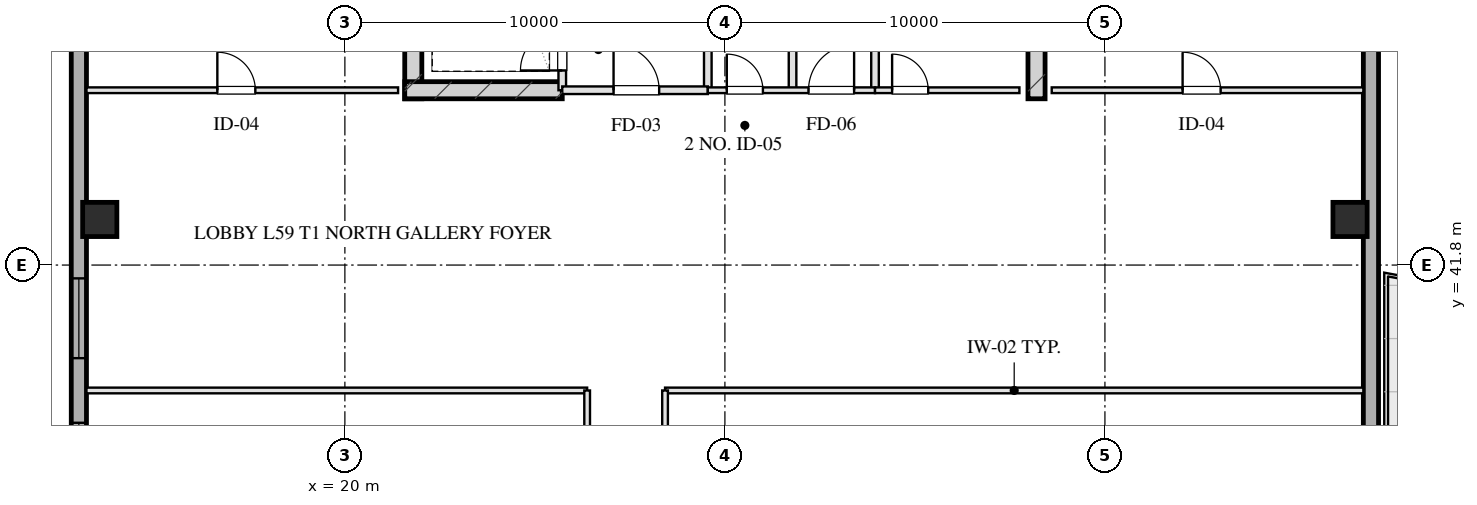
"""IFC4 building model, lengths in metres.
Left out: names, types, materials, properties, quantities, classifications, styles, units other than length and angle.
Written with IfcOpenShell. Run it as: python <this file> out.ifc"""

import sys

from ifc_helpers import new_model, si_unit, direction, frame, frame_2d, origin, origin_2d, place, context, subcontext, project, spatial, rectangle, hollow_rectangle, extrude, element, fill, save


model = new_model("IFC4")
c1 = context("Model", 3, precision=1e-05, world=origin(), true_north=direction((0.0, 1.0)))
c2 = subcontext(c1, "Body", "Model", "MODEL_VIEW")
j1 = project(units=[si_unit("LENGTHUNIT", "METRE"), si_unit("PLANEANGLEUNIT", "RADIAN")], contexts=[c1])
p1 = place(None, origin())
s1 = spatial("IfcSite", under=j1, at=p1, CompositionType="ELEMENT")
p2 = place(p1, origin())
s2 = spatial("IfcBuilding", under=s1, at=p2, CompositionType="ELEMENT")
p3 = place(p2, frame((0.0, 0.0, 219.65)))
s3 = spatial("IfcBuildingStorey", under=s2, at=p3, CompositionType="ELEMENT", Elevation=219.65)
for number, where, z_axis, x_axis in (
    (1, (21.8, 46.175, 0.0), (0.0, 0.0, 1.0), (0.0, 1.0, 0.0)),
    (2, (38.2, 46.175, 0.0), (0.0, 0.0, 1.0), (0.0, 1.0, 0.0)),
):
    element("IfcWall", number, at=place(p3, frame(where, z_axis=z_axis, x_axis=x_axis)), inside=s3, PredefinedType="SHEAR", context=c2, shape_type="SweptSolid", body=[
        extrude(rectangle(XDim=9.33, YDim=0.45, at=frame_2d((4.665, 0.0))), origin(), (0.0, 0.0, 1.0), 3.45),
    ])
p4 = place(p3, frame((21.575, 46.4, 0.0), z_axis=(0.0, 0.0, 1.0), x_axis=(1.0, 0.0, 0.0)))
e3 = element("IfcWall", 3, at=p4, inside=s3, PredefinedType="SHEAR", context=c2, shape_type="SweptSolid", body=[
    extrude(rectangle(XDim=4.145, YDim=0.45, at=frame_2d((2.073, 0.0))), origin(), (0.0, 0.0, 1.0), 3.45),
])
for number, where, z_axis, x_axis in (
    (4, (13.55, 43.0, 0.0), (0.0, 0.0, 1.0), (1.0, 0.0, 0.0)),
    (5, (46.45, 43.0, 0.0), (0.0, 0.0, 1.0), (1.0, 0.0, 0.0)),
):
    element("IfcColumn", number, at=place(p3, frame(where, z_axis=z_axis, x_axis=x_axis)), inside=s3, PredefinedType="COLUMN", context=c2, shape_type="SweptSolid", body=[
        extrude(hollow_rectangle(XDim=0.9, YDim=0.9, WallThickness=0.032, at=origin_2d()), origin(), (0.0, 0.0, 1.0), 3.451),
    ])
p5 = place(p3, frame((13.0, 10.8, 0.0), z_axis=(0.0, 0.0, 1.0), x_axis=(0.0, 1.0, 0.0)))
e6 = element("IfcWall", 6, at=p5, inside=s3, PredefinedType="SOLIDWALL", context=c2, shape_type="SweptSolid", body=[
    extrude(rectangle(XDim=46.4, YDim=0.4, at=frame_2d((23.2, 0.0))), origin(), (0.0, 0.0, 1.0), 2.61),
])
p6 = place(p5, frame((15.75, 0.0, 0.75)))
e7 = element("IfcOpeningElement", 7, at=p6, cuts=e6, PredefinedType="OPENING", context=c2, shape_type="SweptSolid", body=[
    extrude(rectangle(XDim=2.1, YDim=1.46, at=frame_2d((1.05, 0.73))), frame((0.0, 0.21, 0.0), z_axis=(0.0, -1.0, 0.0), x_axis=(1.0, 0.0, 0.0)), (0.0, 0.0, 1.0), 0.42),
])
p7 = place(p5, frame((19.55, 0.0, 0.75)))
e8 = element("IfcOpeningElement", 8, at=p7, cuts=e6, PredefinedType="OPENING", context=c2, shape_type="SweptSolid", body=[
    extrude(rectangle(XDim=2.1, YDim=1.46, at=frame_2d((1.05, 0.73))), frame((0.0, 0.21, 0.0), z_axis=(0.0, -1.0, 0.0), x_axis=(1.0, 0.0, 0.0)), (0.0, 0.0, 1.0), 0.42),
])
p8 = place(p5, frame((24.75, 0.0, 0.75)))
e9 = element("IfcOpeningElement", 9, at=p8, cuts=e6, PredefinedType="OPENING", context=c2, shape_type="SweptSolid", body=[
    extrude(rectangle(XDim=2.1, YDim=1.46, at=frame_2d((1.05, 0.73))), frame((0.0, 0.21, 0.0), z_axis=(0.0, -1.0, 0.0), x_axis=(1.0, 0.0, 0.0)), (0.0, 0.0, 1.0), 0.42),
])
p9 = place(p5, frame((28.55, 0.0, 0.75)))
e10 = element("IfcOpeningElement", 10, at=p9, cuts=e6, PredefinedType="OPENING", context=c2, shape_type="SweptSolid", body=[
    extrude(rectangle(XDim=2.1, YDim=1.46, at=frame_2d((1.05, 0.73))), frame((0.0, 0.21, 0.0), z_axis=(0.0, -1.0, 0.0), x_axis=(1.0, 0.0, 0.0)), (0.0, 0.0, 1.0), 0.42),
])
p10 = place(p3, frame((47.0, 57.2, 0.0), z_axis=(0.0, 0.0, 1.0), x_axis=(0.0, -1.0, 0.0)))
e11 = element("IfcWall", 11, at=p10, inside=s3, PredefinedType="SOLIDWALL", context=c2, shape_type="SweptSolid", body=[
    extrude(rectangle(XDim=46.4, YDim=0.4, at=frame_2d((23.2, 0.0))), origin(), (0.0, 0.0, 1.0), 2.61),
])
p11 = place(p10, frame((20.85, 0.0, 0.0)))
e12 = element("IfcOpeningElement", 12, at=p11, cuts=e11, PredefinedType="OPENING", context=c2, shape_type="SweptSolid", body=[
    extrude(rectangle(XDim=1.8, YDim=2.2, at=frame_2d((0.9, 1.1))), frame((0.0, 0.21, 0.0), z_axis=(0.0, -1.0, 0.0), x_axis=(1.0, 0.0, 0.0)), (0.0, 0.0, 1.0), 0.42),
])
p12 = place(p3, frame((25.72, 46.4, 0.0), z_axis=(0.0, 0.0, 1.0), x_axis=(0.0, 1.0, 0.0)))
e13 = element("IfcWall", 13, at=p12, inside=s3, PredefinedType="PARTITIONING", context=c2, shape_type="SweptSolid", body=[
    extrude(rectangle(XDim=1.9, YDim=0.2, at=frame_2d((0.95, 0.0))), origin(), (0.0, 0.0, 1.0), 3.175),
])
p13 = place(p12, frame((0.52, 0.0, 0.0)))
e14 = element("IfcOpeningElement", 14, at=p13, cuts=e13, PredefinedType="OPENING", context=c2, shape_type="SweptSolid", body=[
    extrude(rectangle(XDim=1.1, YDim=2.05, at=frame_2d((0.55, 1.025))), frame((0.0, 0.11, 0.0), z_axis=(0.0, -1.0, 0.0), x_axis=(1.0, 0.0, 0.0)), (0.0, 0.0, 1.0), 0.22),
])
p14 = place(p3, frame((29.55, 46.4, 0.0), z_axis=(0.0, 0.0, 1.0), x_axis=(0.0, 1.0, 0.0)))
e15 = element("IfcWall", 15, at=p14, inside=s3, PredefinedType="PARTITIONING", context=c2, shape_type="SweptSolid", body=[
    extrude(rectangle(XDim=8.43, YDim=0.2, at=frame_2d((4.215, 0.0))), origin(), (0.0, 0.0, 1.0), 3.175),
])
p15 = place(p3, frame((25.72, 46.4, 0.0), z_axis=(0.0, 0.0, 1.0), x_axis=(1.0, 0.0, 0.0)))
e16 = element("IfcWall", 16, at=p15, inside=s3, PredefinedType="PARTITIONING", context=c2, shape_type="SweptSolid", body=[
    extrude(rectangle(XDim=3.83, YDim=0.2, at=frame_2d((1.915, 0.0))), origin(), (0.0, 0.0, 1.0), 3.175),
])
p16 = place(p15, frame((1.35, 0.0, 0.0)))
e17 = element("IfcOpeningElement", 17, at=p16, cuts=e16, PredefinedType="OPENING", context=c2, shape_type="SweptSolid", body=[
    extrude(rectangle(XDim=1.2, YDim=2.05, at=frame_2d((0.6, 1.025))), frame((0.0, 0.11, 0.0), z_axis=(0.0, -1.0, 0.0), x_axis=(1.0, 0.0, 0.0)), (0.0, 0.0, 1.0), 0.22),
])
for number, where, z_axis, x_axis in (
    (18, (33.95, 46.4, 0.0), (0.0, 0.0, 1.0), (0.0, 1.0, 0.0)),
    (19, (31.78, 46.4, 0.0), (0.0, 0.0, 1.0), (0.0, 1.0, 0.0)),
):
    element("IfcWall", number, at=place(p3, frame(where, z_axis=z_axis, x_axis=x_axis)), inside=s3, PredefinedType="PARTITIONING", context=c2, shape_type="SweptSolid", body=[
        extrude(rectangle(XDim=8.43, YDim=0.2, at=frame_2d((4.215, 0.0))), origin(), (0.0, 0.0, 1.0), 3.175),
    ])
p17 = place(p3, frame((29.55, 46.4, 0.0), z_axis=(0.0, 0.0, 1.0), x_axis=(1.0, 0.0, 0.0)))
e20 = element("IfcWall", 20, at=p17, inside=s3, PredefinedType="PARTITIONING", context=c2, shape_type="SweptSolid", body=[
    extrude(rectangle(XDim=4.4, YDim=0.15, at=frame_2d((2.2, 0.0))), origin(), (0.0, 0.0, 1.0), 3.175),
])
p18 = place(p17, frame((0.5, 0.0, 0.0)))
e21 = element("IfcOpeningElement", 21, at=p18, cuts=e20, PredefinedType="OPENING", context=c2, shape_type="SweptSolid", body=[
    extrude(rectangle(XDim=0.95, YDim=2.05, at=frame_2d((0.475, 1.025))), frame((0.0, 0.085, 0.0), z_axis=(0.0, -1.0, 0.0), x_axis=(1.0, 0.0, 0.0)), (0.0, 0.0, 1.0), 0.17),
])
p19 = place(p17, frame((2.65, 0.0, 0.0)))
e22 = element("IfcOpeningElement", 22, at=p19, cuts=e20, PredefinedType="OPENING", context=c2, shape_type="SweptSolid", body=[
    extrude(rectangle(XDim=1.2, YDim=2.05, at=frame_2d((0.6, 1.025))), frame((0.0, 0.085, 0.0), z_axis=(0.0, -1.0, 0.0), x_axis=(1.0, 0.0, 0.0)), (0.0, 0.0, 1.0), 0.17),
])
p20 = place(p3, frame((33.95, 46.4, 0.0), z_axis=(0.0, 0.0, 1.0), x_axis=(1.0, 0.0, 0.0)))
e23 = element("IfcWall", 23, at=p20, inside=s3, PredefinedType="PARTITIONING", context=c2, shape_type="SweptSolid", body=[
    extrude(rectangle(XDim=3.8, YDim=0.15, at=frame_2d((1.9, 0.0))), origin(), (0.0, 0.0, 1.0), 3.175),
])
p21 = place(p20, frame((0.45, 0.0, 0.0)))
e24 = element("IfcOpeningElement", 24, at=p21, cuts=e23, PredefinedType="OPENING", context=c2, shape_type="SweptSolid", body=[
    extrude(rectangle(XDim=0.95, YDim=2.05, at=frame_2d((0.475, 1.025))), frame((0.0, 0.085, 0.0), z_axis=(0.0, -1.0, 0.0), x_axis=(1.0, 0.0, 0.0)), (0.0, 0.0, 1.0), 0.17),
])
p22 = place(p3, frame((13.2, 46.4, 0.0), z_axis=(0.0, 0.0, 1.0), x_axis=(1.0, 0.0, 0.0)))
e25 = element("IfcWall", 25, at=p22, inside=s3, PredefinedType="PARTITIONING", context=c2, shape_type="SweptSolid", body=[
    extrude(rectangle(XDim=8.2, YDim=0.15, at=frame_2d((4.1, 0.0))), origin(), (0.0, 0.0, 1.0), 3.175),
])
p23 = place(p22, frame((3.444, 0.0, 0.0)))
e26 = element("IfcOpeningElement", 26, at=p23, cuts=e25, PredefinedType="OPENING", context=c2, shape_type="SweptSolid", body=[
    extrude(rectangle(XDim=1.0, YDim=2.05, at=frame_2d((0.5, 1.025))), frame((0.0, 0.085, 0.0), z_axis=(0.0, -1.0, 0.0), x_axis=(1.0, 0.0, 0.0)), (0.0, 0.0, 1.0), 0.17),
])
p24 = place(p3, frame((38.6, 46.4, 0.0), z_axis=(0.0, 0.0, 1.0), x_axis=(1.0, 0.0, 0.0)))
e27 = element("IfcWall", 27, at=p24, inside=s3, PredefinedType="PARTITIONING", context=c2, shape_type="SweptSolid", body=[
    extrude(rectangle(XDim=8.2, YDim=0.15, at=frame_2d((4.1, 0.0))), origin(), (0.0, 0.0, 1.0), 3.175),
])
p25 = place(p24, frame((3.444, 0.0, 0.0)))
e28 = element("IfcOpeningElement", 28, at=p25, cuts=e27, PredefinedType="OPENING", context=c2, shape_type="SweptSolid", body=[
    extrude(rectangle(XDim=1.0, YDim=2.05, at=frame_2d((0.5, 1.025))), frame((0.0, 0.085, 0.0), z_axis=(0.0, -1.0, 0.0), x_axis=(1.0, 0.0, 0.0)), (0.0, 0.0, 1.0), 0.17),
])
p26 = place(p3, frame((13.2, 38.5, 0.0), z_axis=(0.0, 0.0, 1.0), x_axis=(1.0, 0.0, 0.0)))
e29 = element("IfcWall", 29, at=p26, inside=s3, PredefinedType="PARTITIONING", context=c2, shape_type="SweptSolid", body=[
    extrude(rectangle(XDim=13.175, YDim=0.15, at=frame_2d((6.587, 0.0))), origin(), (0.0, 0.0, 1.0), 3.175),
])
p27 = place(p3, frame((28.425, 38.5, 0.0), z_axis=(0.0, 0.0, 1.0), x_axis=(1.0, 0.0, 0.0)))
e30 = element("IfcWall", 30, at=p27, inside=s3, PredefinedType="PARTITIONING", context=c2, shape_type="SweptSolid", body=[
    extrude(rectangle(XDim=18.375, YDim=0.15, at=frame_2d((9.188, 0.0))), origin(), (0.0, 0.0, 1.0), 3.175),
])
p28 = place(p3, frame((26.375, 29.5, 0.0), z_axis=(0.0, 0.0, 1.0), x_axis=(0.0, 1.0, 0.0)))
e31 = element("IfcWall", 31, at=p28, inside=s3, PredefinedType="PARTITIONING", context=c2, shape_type="SweptSolid", body=[
    extrude(rectangle(XDim=9.0, YDim=0.15, at=frame_2d((4.5, 0.0))), origin(), (0.0, 0.0, 1.0), 3.175),
])
p29 = place(p28, frame((1.16, 0.0, 0.0)))
e32 = element("IfcOpeningElement", 32, at=p29, cuts=e31, PredefinedType="OPENING", context=c2, shape_type="SweptSolid", body=[
    extrude(rectangle(XDim=1.0, YDim=2.05, at=frame_2d((0.5, 1.025))), frame((0.0, 0.085, 0.0), z_axis=(0.0, -1.0, 0.0), x_axis=(1.0, 0.0, 0.0)), (0.0, 0.0, 1.0), 0.17),
])
p30 = place(p28, frame((5.66, 0.0, 0.0)))
e33 = element("IfcOpeningElement", 33, at=p30, cuts=e31, PredefinedType="OPENING", context=c2, shape_type="SweptSolid", body=[
    extrude(rectangle(XDim=1.05, YDim=2.05, at=frame_2d((0.525, 1.025))), frame((0.0, 0.085, 0.0), z_axis=(0.0, -1.0, 0.0), x_axis=(1.0, 0.0, 0.0)), (0.0, 0.0, 1.0), 0.17),
])
p31 = place(p3, frame((28.425, 29.5, 0.0), z_axis=(0.0, 0.0, 1.0), x_axis=(0.0, 1.0, 0.0)))
e34 = element("IfcWall", 34, at=p31, inside=s3, PredefinedType="PARTITIONING", context=c2, shape_type="SweptSolid", body=[
    extrude(rectangle(XDim=9.0, YDim=0.15, at=frame_2d((4.5, 0.0))), origin(), (0.0, 0.0, 1.0), 3.175),
])
p32 = place(p31, frame((1.16, 0.0, 0.0)))
e35 = element("IfcOpeningElement", 35, at=p32, cuts=e34, PredefinedType="OPENING", context=c2, shape_type="SweptSolid", body=[
    extrude(rectangle(XDim=1.0, YDim=2.05, at=frame_2d((0.5, 1.025))), frame((0.0, 0.085, 0.0), z_axis=(0.0, -1.0, 0.0), x_axis=(1.0, 0.0, 0.0)), (0.0, 0.0, 1.0), 0.17),
])
p33 = place(p31, frame((5.56, 0.0, 0.0)))
e36 = element("IfcOpeningElement", 36, at=p33, cuts=e34, PredefinedType="OPENING", context=c2, shape_type="SweptSolid", body=[
    extrude(rectangle(XDim=1.2, YDim=2.05, at=frame_2d((0.6, 1.025))), frame((0.0, 0.085, 0.0), z_axis=(0.0, -1.0, 0.0), x_axis=(1.0, 0.0, 0.0)), (0.0, 0.0, 1.0), 0.17),
])
p34 = place(p8, origin())
e37 = element("IfcWindow", 37, at=p34, inside=s3, PartitioningType="TRIPLE_PANEL_VERTICAL", PredefinedType="WINDOW", context=c2, shape_type="SweptSolid", body=[
    extrude(rectangle(XDim=2.1, YDim=1.46, at=frame_2d((1.05, 0.73))), frame((0.0, 0.03, 0.0), z_axis=(0.0, -1.0, 0.0), x_axis=(1.0, 0.0, 0.0)), (0.0, 0.0, 1.0), 0.06),
])
fill(e9, e37)
p35 = place(p9, origin())
e38 = element("IfcWindow", 38, at=p35, inside=s3, PartitioningType="TRIPLE_PANEL_VERTICAL", PredefinedType="WINDOW", context=c2, shape_type="SweptSolid", body=[
    extrude(rectangle(XDim=2.1, YDim=1.46, at=frame_2d((1.05, 0.73))), frame((0.0, 0.03, 0.0), z_axis=(0.0, -1.0, 0.0), x_axis=(1.0, 0.0, 0.0)), (0.0, 0.0, 1.0), 0.06),
])
fill(e10, e38)
p36 = place(p13, origin())
e39 = element("IfcDoor", 39, at=p36, inside=s3, OperationType="SINGLE_SWING_LEFT", PredefinedType="DOOR", context=c2, shape_type="SweptSolid", body=[
    extrude(rectangle(XDim=1.1, YDim=2.05, at=frame_2d((0.55, 1.025))), frame((0.0, 0.025, 0.0), z_axis=(0.0, -1.0, 0.0), x_axis=(1.0, 0.0, 0.0)), (0.0, 0.0, 1.0), 0.05),
])
fill(e14, e39)
p37 = place(p16, origin())
e40 = element("IfcDoor", 40, at=p37, inside=s3, OperationType="SINGLE_SWING_LEFT", PredefinedType="DOOR", context=c2, shape_type="SweptSolid", body=[
    extrude(rectangle(XDim=1.2, YDim=2.05, at=frame_2d((0.6, 1.025))), frame((0.0, 0.025, 0.0), z_axis=(0.0, -1.0, 0.0), x_axis=(1.0, 0.0, 0.0)), (0.0, 0.0, 1.0), 0.05),
])
fill(e17, e40)
p38 = place(p18, origin())
e41 = element("IfcDoor", 41, at=p38, inside=s3, OperationType="SINGLE_SWING_LEFT", PredefinedType="DOOR", context=c2, shape_type="SweptSolid", body=[
    extrude(rectangle(XDim=0.95, YDim=2.05, at=frame_2d((0.475, 1.025))), frame((0.0, 0.025, 0.0), z_axis=(0.0, -1.0, 0.0), x_axis=(1.0, 0.0, 0.0)), (0.0, 0.0, 1.0), 0.05),
])
fill(e21, e41)
p39 = place(p19, origin())
e42 = element("IfcDoor", 42, at=p39, inside=s3, OperationType="SINGLE_SWING_RIGHT", PredefinedType="DOOR", context=c2, shape_type="SweptSolid", body=[
    extrude(rectangle(XDim=1.2, YDim=2.05, at=frame_2d((0.6, 1.025))), frame((0.0, 0.025, 0.0), z_axis=(0.0, -1.0, 0.0), x_axis=(1.0, 0.0, 0.0)), (0.0, 0.0, 1.0), 0.05),
])
fill(e22, e42)
p40 = place(p21, origin())
e43 = element("IfcDoor", 43, at=p40, inside=s3, OperationType="SINGLE_SWING_LEFT", PredefinedType="DOOR", context=c2, shape_type="SweptSolid", body=[
    extrude(rectangle(XDim=0.95, YDim=2.05, at=frame_2d((0.475, 1.025))), frame((0.0, 0.025, 0.0), z_axis=(0.0, -1.0, 0.0), x_axis=(1.0, 0.0, 0.0)), (0.0, 0.0, 1.0), 0.05),
])
fill(e24, e43)
p41 = place(p23, origin())
e44 = element("IfcDoor", 44, at=p41, inside=s3, OperationType="SINGLE_SWING_LEFT", PredefinedType="DOOR", context=c2, shape_type="SweptSolid", body=[
    extrude(rectangle(XDim=1.0, YDim=2.05, at=frame_2d((0.5, 1.025))), frame((0.0, 0.025, 0.0), z_axis=(0.0, -1.0, 0.0), x_axis=(1.0, 0.0, 0.0)), (0.0, 0.0, 1.0), 0.05),
])
fill(e26, e44)
p42 = place(p25, origin())
e45 = element("IfcDoor", 45, at=p42, inside=s3, OperationType="SINGLE_SWING_LEFT", PredefinedType="DOOR", context=c2, shape_type="SweptSolid", body=[
    extrude(rectangle(XDim=1.0, YDim=2.05, at=frame_2d((0.5, 1.025))), frame((0.0, 0.025, 0.0), z_axis=(0.0, -1.0, 0.0), x_axis=(1.0, 0.0, 0.0)), (0.0, 0.0, 1.0), 0.05),
])
fill(e28, e45)
save(model, sys.argv[1])
